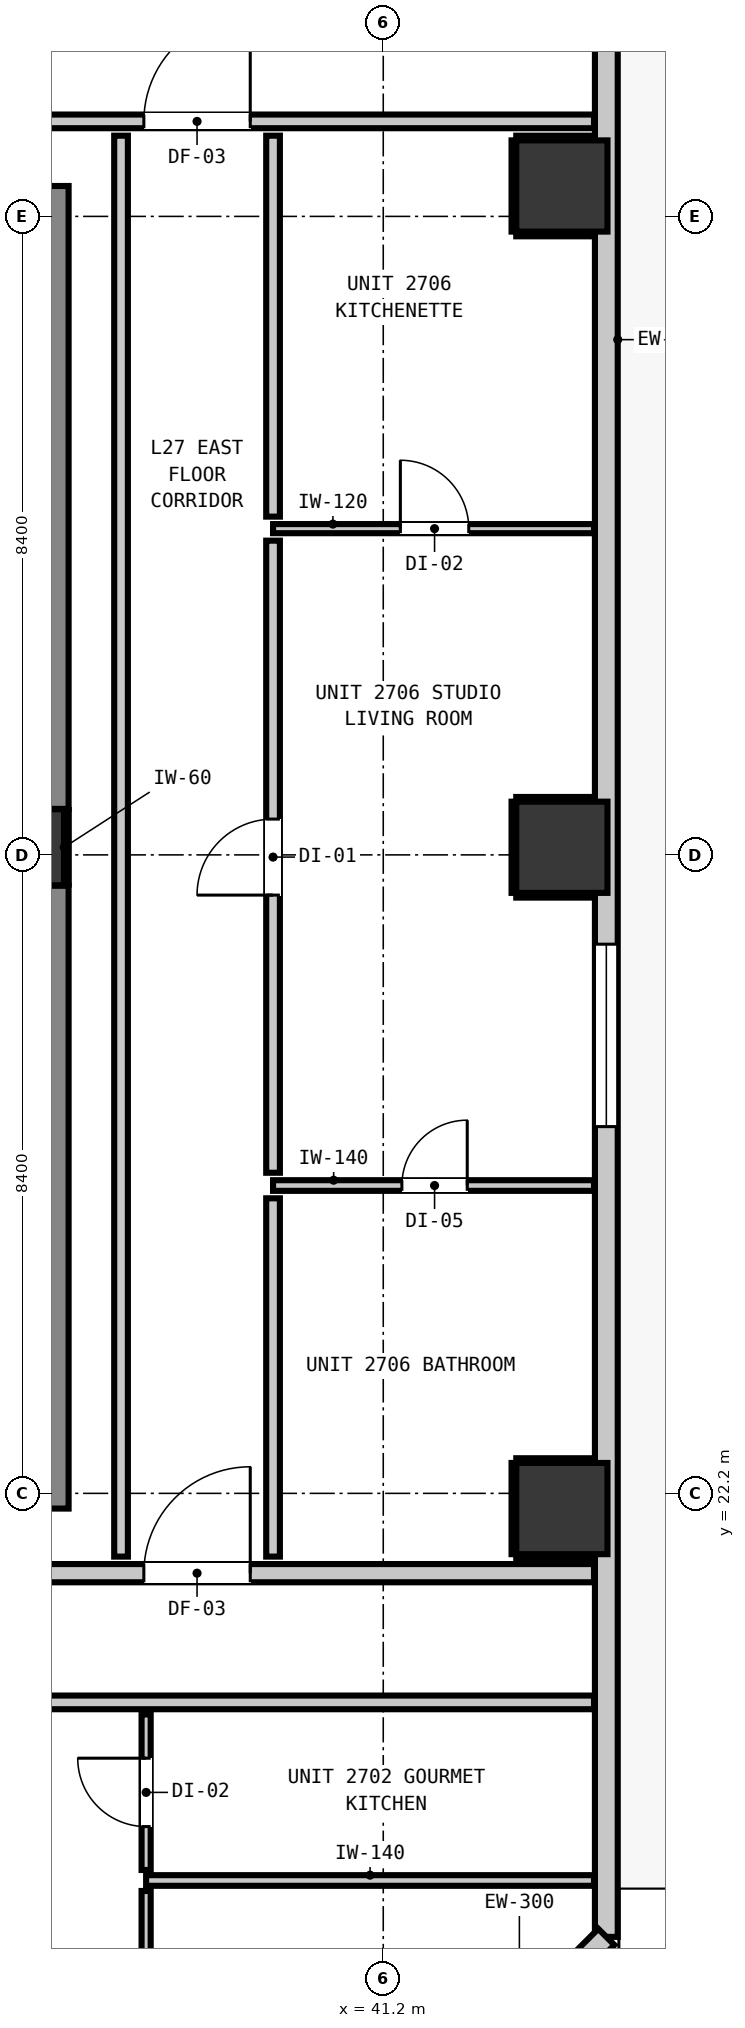
"""IFC4 building model, lengths in metres.
Left out: names, types, materials, properties, quantities, classifications, styles, units other than length and angle.
Written with IfcOpenShell. Run it as: python <this file> out.ifc"""

import sys

from ifc_helpers import new_model, si_unit, direction, frame, frame_2d, origin, origin_2d, place, context, subcontext, project, spatial, rectangle, extrude, element, fill, save


model = new_model("IFC4")
c1 = context("Model", 3, precision=1e-05, world=origin(), true_north=direction((0.0, 1.0)))
c2 = subcontext(c1, "Body", "Model", "MODEL_VIEW")
j1 = project(units=[si_unit("LENGTHUNIT", "METRE"), si_unit("PLANEANGLEUNIT", "RADIAN")], contexts=[c1])
p1 = place(None, origin())
s1 = spatial("IfcSite", under=j1, at=p1, CompositionType="ELEMENT")
p2 = place(p1, origin())
s2 = spatial("IfcBuilding", under=s1, at=p2, CompositionType="ELEMENT")
p3 = place(p2, frame((0.0, 0.0, 96.12)))
s3 = spatial("IfcBuildingStorey", under=s2, at=p3, CompositionType="ELEMENT", Elevation=96.12)
p4 = place(p3, frame((36.5, 30.7, 0.0), z_axis=(0.0, 0.0, 1.0), x_axis=(1.0, 0.0, 0.0)))
e1 = element("IfcColumn", 1, at=p4, inside=s3, PredefinedType="COLUMN", context=c2, shape_type="SweptSolid", body=[
    extrude(rectangle(XDim=1.0, YDim=1.0, at=origin_2d()), origin(), (0.0, 0.0, 1.0), 3.32),
])
p5 = place(p3, frame((36.56, 22.0, 0.0), z_axis=(0.0, 0.0, 1.0), x_axis=(0.0, 1.0, 0.0)))
e2 = element("IfcWall", 2, at=p5, inside=s3, PredefinedType="SHEAR", context=c2, shape_type="SweptSolid", body=[
    extrude(rectangle(XDim=8.195, YDim=1.0, at=frame_2d((4.098, 0.0))), origin(), (0.0, 0.0, 1.0), 3.32),
])
p6 = place(p3, frame((36.56, 31.205, 0.0), z_axis=(0.0, 0.0, 1.0), x_axis=(0.0, 1.0, 0.0)))
e3 = element("IfcWall", 3, at=p6, inside=s3, PredefinedType="SHEAR", context=c2, shape_type="SweptSolid", body=[
    extrude(rectangle(XDim=8.195, YDim=1.0, at=frame_2d((4.097, 0.0))), origin(), (0.0, 0.0, 1.0), 3.32),
])
for number, where, z_axis, x_axis in (
    (4, (43.55, 22.0, 0.0), (0.0, 0.0, 1.0), (1.0, 0.0, 0.0)),
    (5, (43.55, 30.7, 0.0), (0.0, 0.0, 1.0), (1.0, 0.0, 0.0)),
    (6, (43.55, 39.4, 0.0), (0.0, 0.0, 1.0), (1.0, 0.0, 0.0)),
):
    element("IfcColumn", number, at=place(p3, frame(where, z_axis=z_axis, x_axis=x_axis)), inside=s3, PredefinedType="COLUMN", context=c2, shape_type="SweptSolid", body=[
        extrude(rectangle(XDim=1.2, YDim=1.2, at=origin_2d()), origin(), (0.0, 0.0, 1.0), 3.32),
    ])
p7 = place(p3, frame((44.135, 51.035, 0.0), z_axis=(0.0, 0.0, 1.0), x_axis=(0.0, -1.0, 0.0)))
e7 = element("IfcWall", 7, at=p7, inside=s3, PredefinedType="STANDARD", context=c2, shape_type="SweptSolid", body=[
    extrude(rectangle(XDim=34.67, YDim=0.3, at=frame_2d((17.335, 0.0))), origin(), (0.0, 0.0, 1.0), 3.06),
])
p8 = place(p7, frame((0.901, 0.0, 0.0)))
e8 = element("IfcOpeningElement", 8, at=p8, cuts=e7, PredefinedType="OPENING", context=c2, shape_type="SweptSolid", body=[
    extrude(rectangle(XDim=1.0, YDim=2.15, at=frame_2d((0.5, 1.075))), frame((0.0, 0.16, 0.0), z_axis=(0.0, -1.0, 0.0), x_axis=(1.0, 0.0, 0.0)), (0.0, 0.0, 1.0), 0.32),
])
p9 = place(p7, frame((3.303, 0.0, 0.85)))
e9 = element("IfcOpeningElement", 9, at=p9, cuts=e7, PredefinedType="OPENING", context=c2, shape_type="SweptSolid", body=[
    extrude(rectangle(XDim=2.4, YDim=1.95, at=frame_2d((1.2, 0.975))), frame((0.0, 0.16, 0.0), z_axis=(0.0, -1.0, 0.0), x_axis=(1.0, 0.0, 0.0)), (0.0, 0.0, 1.0), 0.32),
])
p10 = place(p7, frame((21.61, 0.0, 0.85)))
e10 = element("IfcOpeningElement", 10, at=p10, cuts=e7, PredefinedType="OPENING", context=c2, shape_type="SweptSolid", body=[
    extrude(rectangle(XDim=2.4, YDim=1.95, at=frame_2d((1.2, 0.975))), frame((0.0, 0.16, 0.0), z_axis=(0.0, -1.0, 0.0), x_axis=(1.0, 0.0, 0.0)), (0.0, 0.0, 1.0), 0.32),
])
p11 = place(p3, frame((44.135, 16.365, 0.0), z_axis=(0.0, 0.0, 1.0), x_axis=(-0.707106781187, -0.707106781187, 0.0)))
e11 = element("IfcWall", 11, at=p11, inside=s3, PredefinedType="STANDARD", context=c2, shape_type="SweptSolid", body=[
    extrude(rectangle(XDim=3.536, YDim=0.3, at=frame_2d((1.768, 0.0))), origin(), (0.0, 0.0, 1.0), 3.06),
])
p12 = place(p3, frame((12.993, 21.15, 0.0), z_axis=(0.0, 0.0, 1.0), x_axis=(1.0, 0.0, 0.0)))
e12 = element("IfcWall", 12, at=p12, inside=s3, PredefinedType="PARTITIONING", context=c2, shape_type="SweptSolid", body=[
    extrude(rectangle(XDim=30.98, YDim=0.24, at=frame_2d((15.49, 0.0))), origin(), (0.0, 0.0, 1.0), 3.06),
])
p13 = place(p12, frame((5.217, 0.0, 0.0)))
e13 = element("IfcOpeningElement", 13, at=p13, cuts=e12, PredefinedType="OPENING", context=c2, shape_type="SweptSolid", body=[
    extrude(rectangle(XDim=1.1, YDim=2.15, at=frame_2d((0.55, 1.075))), frame((0.0, 0.13, 0.0), z_axis=(0.0, -1.0, 0.0), x_axis=(1.0, 0.0, 0.0)), (0.0, 0.0, 1.0), 0.26),
])
p14 = place(p12, frame((25.057, 0.0, 0.0)))
e14 = element("IfcOpeningElement", 14, at=p14, cuts=e12, PredefinedType="OPENING", context=c2, shape_type="SweptSolid", body=[
    extrude(rectangle(XDim=1.4, YDim=2.15, at=frame_2d((0.7, 1.075))), frame((0.0, 0.13, 0.0), z_axis=(0.0, -1.0, 0.0), x_axis=(1.0, 0.0, 0.0)), (0.0, 0.0, 1.0), 0.26),
])
p15 = place(p3, frame((12.993, 19.45, 0.0), z_axis=(0.0, 0.0, 1.0), x_axis=(1.0, 0.0, 0.0)))
e15 = element("IfcWall", 15, at=p15, inside=s3, PredefinedType="PARTITIONING", context=c2, shape_type="SweptSolid", body=[
    extrude(rectangle(XDim=30.98, YDim=0.18, at=frame_2d((15.49, 0.0))), origin(), (0.0, 0.0, 1.0), 3.06),
])
p16 = place(p15, frame((20.937, 0.0, 0.0)))
e16 = element("IfcOpeningElement", 16, at=p16, cuts=e15, PredefinedType="OPENING", context=c2, shape_type="SweptSolid", body=[
    extrude(rectangle(XDim=1.0, YDim=2.15, at=frame_2d((0.5, 1.075))), frame((0.0, 0.1, 0.0), z_axis=(0.0, -1.0, 0.0), x_axis=(1.0, 0.0, 0.0)), (0.0, 0.0, 1.0), 0.2),
])
p17 = place(p3, frame((1.827, 40.25, 0.0), z_axis=(0.0, 0.0, 1.0), x_axis=(1.0, 0.0, 0.0)))
e17 = element("IfcWall", 17, at=p17, inside=s3, PredefinedType="PARTITIONING", context=c2, shape_type="SweptSolid", body=[
    extrude(rectangle(XDim=42.146, YDim=0.18, at=frame_2d((21.073, 0.0))), origin(), (0.0, 0.0, 1.0), 3.06),
])
p18 = place(p17, frame((15.608, 0.0, 0.0)))
e18 = element("IfcOpeningElement", 18, at=p18, cuts=e17, PredefinedType="OPENING", context=c2, shape_type="SweptSolid", body=[
    extrude(rectangle(XDim=1.4, YDim=2.15, at=frame_2d((0.7, 1.075))), frame((0.0, 0.1, 0.0), z_axis=(0.0, -1.0, 0.0), x_axis=(1.0, 0.0, 0.0)), (0.0, 0.0, 1.0), 0.2),
])
p19 = place(p17, frame((8.623, 0.0, 0.0)))
e19 = element("IfcOpeningElement", 19, at=p19, cuts=e17, PredefinedType="OPENING", context=c2, shape_type="SweptSolid", body=[
    extrude(rectangle(XDim=1.4, YDim=2.15, at=frame_2d((0.7, 1.075))), frame((0.0, 0.1, 0.0), z_axis=(0.0, -1.0, 0.0), x_axis=(1.0, 0.0, 0.0)), (0.0, 0.0, 1.0), 0.2),
])
p20 = place(p17, frame((36.223, 0.0, 0.0)))
e20 = element("IfcOpeningElement", 20, at=p20, cuts=e17, PredefinedType="OPENING", context=c2, shape_type="SweptSolid", body=[
    extrude(rectangle(XDim=1.4, YDim=2.15, at=frame_2d((0.7, 1.075))), frame((0.0, 0.1, 0.0), z_axis=(0.0, -1.0, 0.0), x_axis=(1.0, 0.0, 0.0)), (0.0, 0.0, 1.0), 0.2),
])
p21 = place(p3, frame((38.08, 17.107, 0.0), z_axis=(0.0, 0.0, 1.0), x_axis=(1.0, 0.0, 0.0)))
e21 = element("IfcWall", 21, at=p21, inside=s3, PredefinedType="PARTITIONING", context=c2, shape_type="SweptSolid", body=[
    extrude(rectangle(XDim=5.893, YDim=0.14, at=frame_2d((2.946, 0.0))), origin(), (0.0, 0.0, 1.0), 3.06),
])
p22 = place(p3, frame((39.75, 26.25, 0.0), z_axis=(0.0, 0.0, 1.0), x_axis=(1.0, 0.0, 0.0)))
e22 = element("IfcWall", 22, at=p22, inside=s3, PredefinedType="PARTITIONING", context=c2, shape_type="SweptSolid", body=[
    extrude(rectangle(XDim=4.223, YDim=0.14, at=frame_2d((2.111, 0.0))), origin(), (0.0, 0.0, 1.0), 3.06),
])
p23 = place(p22, frame((1.695, 0.0, 0.0)))
e23 = element("IfcOpeningElement", 23, at=p23, cuts=e22, PredefinedType="OPENING", context=c2, shape_type="SweptSolid", body=[
    extrude(rectangle(XDim=0.86, YDim=2.02, at=frame_2d((0.43, 1.01))), frame((0.0, 0.08, 0.0), z_axis=(0.0, -1.0, 0.0), x_axis=(1.0, 0.0, 0.0)), (0.0, 0.0, 1.0), 0.16),
])
p24 = place(p3, frame((39.75, 34.892, 0.0), z_axis=(0.0, 0.0, 1.0), x_axis=(1.0, 0.0, 0.0)))
e24 = element("IfcWall", 24, at=p24, inside=s3, PredefinedType="PARTITIONING", context=c2, shape_type="SweptSolid", body=[
    extrude(rectangle(XDim=4.223, YDim=0.12, at=frame_2d((2.111, 0.0))), origin(), (0.0, 0.0, 1.0), 3.06),
])
p25 = place(p24, frame((1.675, 0.0, 0.0)))
e25 = element("IfcOpeningElement", 25, at=p25, cuts=e24, PredefinedType="OPENING", context=c2, shape_type="SweptSolid", body=[
    extrude(rectangle(XDim=0.9, YDim=2.1, at=frame_2d((0.45, 1.05))), frame((0.0, 0.07, 0.0), z_axis=(0.0, -1.0, 0.0), x_axis=(1.0, 0.0, 0.0)), (0.0, 0.0, 1.0), 0.14),
])
p26 = place(p3, frame((37.75, 21.368, 0.0), z_axis=(0.0, 0.0, 1.0), x_axis=(0.0, 1.0, 0.0)))
e26 = element("IfcWall", 26, at=p26, inside=s3, PredefinedType="PARTITIONING", context=c2, shape_type="SweptSolid", body=[
    extrude(rectangle(XDim=18.694, YDim=0.18, at=frame_2d((9.347, 0.0))), origin(), (0.0, 0.0, 1.0), 3.06),
])
p27 = place(p3, frame((39.75, 21.368, 0.0), z_axis=(0.0, 0.0, 1.0), x_axis=(0.0, 1.0, 0.0)))
e27 = element("IfcWall", 27, at=p27, inside=s3, PredefinedType="PARTITIONING", context=c2, shape_type="SweptSolid", body=[
    extrude(rectangle(XDim=4.714, YDim=0.18, at=frame_2d((2.357, 0.0))), origin(), (0.0, 0.0, 1.0), 3.06),
])
p28 = place(p3, frame((39.75, 26.418, 0.0), z_axis=(0.0, 0.0, 1.0), x_axis=(0.0, 1.0, 0.0)))
e28 = element("IfcWall", 28, at=p28, inside=s3, PredefinedType="PARTITIONING", context=c2, shape_type="SweptSolid", body=[
    extrude(rectangle(XDim=8.316, YDim=0.18, at=frame_2d((4.158, 0.0))), origin(), (0.0, 0.0, 1.0), 3.06),
])
p29 = place(p28, frame((3.653, 0.0, 0.0)))
e29 = element("IfcOpeningElement", 29, at=p29, cuts=e28, PredefinedType="OPENING", context=c2, shape_type="SweptSolid", body=[
    extrude(rectangle(XDim=1.0, YDim=2.15, at=frame_2d((0.5, 1.075))), frame((0.0, 0.1, 0.0), z_axis=(0.0, -1.0, 0.0), x_axis=(1.0, 0.0, 0.0)), (0.0, 0.0, 1.0), 0.2),
])
p30 = place(p3, frame((39.75, 35.05, 0.0), z_axis=(0.0, 0.0, 1.0), x_axis=(0.0, 1.0, 0.0)))
e30 = element("IfcWall", 30, at=p30, inside=s3, PredefinedType="PARTITIONING", context=c2, shape_type="SweptSolid", body=[
    extrude(rectangle(XDim=5.012, YDim=0.18, at=frame_2d((2.506, 0.0))), origin(), (0.0, 0.0, 1.0), 3.06),
])
p31 = place(p3, frame((38.08, 14.027, 0.0), z_axis=(0.0, 0.0, 1.0), x_axis=(0.0, 1.0, 0.0)))
e31 = element("IfcWall", 31, at=p31, inside=s3, PredefinedType="PARTITIONING", context=c2, shape_type="SweptSolid", body=[
    extrude(rectangle(XDim=2.942, YDim=0.12, at=frame_2d((1.471, 0.0))), origin(), (0.0, 0.0, 1.0), 3.06),
])
p32 = place(p31, frame((1.249, 0.0, 0.0)))
e32 = element("IfcOpeningElement", 32, at=p32, cuts=e31, PredefinedType="OPENING", context=c2, shape_type="SweptSolid", body=[
    extrude(rectangle(XDim=0.9, YDim=2.1, at=frame_2d((0.45, 1.05))), frame((0.0, 0.07, 0.0), z_axis=(0.0, -1.0, 0.0), x_axis=(1.0, 0.0, 0.0)), (0.0, 0.0, 1.0), 0.14),
])
p33 = place(p3, frame((38.08, 17.245, 0.0), z_axis=(0.0, 0.0, 1.0), x_axis=(0.0, 1.0, 0.0)))
e33 = element("IfcWall", 33, at=p33, inside=s3, PredefinedType="PARTITIONING", context=c2, shape_type="SweptSolid", body=[
    extrude(rectangle(XDim=2.047, YDim=0.12, at=frame_2d((1.023, 0.0))), origin(), (0.0, 0.0, 1.0), 3.06),
])
p34 = place(p33, frame((0.571, 0.0, 0.0)))
e34 = element("IfcOpeningElement", 34, at=p34, cuts=e33, PredefinedType="OPENING", context=c2, shape_type="SweptSolid", body=[
    extrude(rectangle(XDim=0.9, YDim=2.1, at=frame_2d((0.45, 1.05))), frame((0.0, 0.07, 0.0), z_axis=(0.0, -1.0, 0.0), x_axis=(1.0, 0.0, 0.0)), (0.0, 0.0, 1.0), 0.14),
])
p35 = place(p3, frame((37.032, 30.21, 0.0), z_axis=(0.0, 0.0, 1.0), x_axis=(0.0, 1.0, 0.0)))
e35 = element("IfcWall", 35, at=p35, inside=s3, PredefinedType="PARTITIONING", context=c2, shape_type="SweptSolid", body=[
    extrude(rectangle(XDim=0.98, YDim=0.06, at=frame_2d((0.49, 0.0))), origin(), (0.0, 0.0, 1.0), 1.45),
])
for number, where, z_axis, x_axis in (
    (36, (42.95, 21.368, 0.0), (0.0, 0.0, 1.0), (1.0, 0.0, 0.0)),
    (37, (42.95, 22.632, 0.0), (0.0, 0.0, 1.0), (1.0, 0.0, 0.0)),
):
    element("IfcWall", number, at=place(p3, frame(where, z_axis=z_axis, x_axis=x_axis)), inside=s3, PredefinedType="PARTITIONING", context=c2, shape_type="SweptSolid", body=[
        extrude(rectangle(XDim=1.02, YDim=0.06, at=frame_2d((0.51, 0.0))), origin(), (0.0, 0.0, 1.0), 1.45),
    ])
p36 = place(p3, frame((42.918, 21.4, 0.0), z_axis=(0.0, 0.0, 1.0), x_axis=(0.0, 1.0, 0.0)))
e38 = element("IfcWall", 38, at=p36, inside=s3, PredefinedType="PARTITIONING", context=c2, shape_type="SweptSolid", body=[
    extrude(rectangle(XDim=1.2, YDim=0.06, at=frame_2d((0.6, 0.0))), origin(), (0.0, 0.0, 1.0), 1.45),
])
for number, where, z_axis, x_axis in (
    (39, (42.95, 30.068, 0.0), (0.0, 0.0, 1.0), (1.0, 0.0, 0.0)),
    (40, (42.95, 31.332, 0.0), (0.0, 0.0, 1.0), (1.0, 0.0, 0.0)),
):
    element("IfcWall", number, at=place(p3, frame(where, z_axis=z_axis, x_axis=x_axis)), inside=s3, PredefinedType="PARTITIONING", context=c2, shape_type="SweptSolid", body=[
        extrude(rectangle(XDim=1.02, YDim=0.06, at=frame_2d((0.51, 0.0))), origin(), (0.0, 0.0, 1.0), 1.45),
    ])
p37 = place(p3, frame((42.918, 30.1, 0.0), z_axis=(0.0, 0.0, 1.0), x_axis=(0.0, 1.0, 0.0)))
e41 = element("IfcWall", 41, at=p37, inside=s3, PredefinedType="PARTITIONING", context=c2, shape_type="SweptSolid", body=[
    extrude(rectangle(XDim=1.2, YDim=0.06, at=frame_2d((0.6, 0.0))), origin(), (0.0, 0.0, 1.0), 1.45),
])
for number, where, z_axis, x_axis in (
    (42, (42.95, 38.768, 0.0), (0.0, 0.0, 1.0), (1.0, 0.0, 0.0)),
    (43, (42.95, 40.032, 0.0), (0.0, 0.0, 1.0), (1.0, 0.0, 0.0)),
):
    element("IfcWall", number, at=place(p3, frame(where, z_axis=z_axis, x_axis=x_axis)), inside=s3, PredefinedType="PARTITIONING", context=c2, shape_type="SweptSolid", body=[
        extrude(rectangle(XDim=1.02, YDim=0.06, at=frame_2d((0.51, 0.0))), origin(), (0.0, 0.0, 1.0), 1.45),
    ])
p38 = place(p3, frame((42.918, 38.8, 0.0), z_axis=(0.0, 0.0, 1.0), x_axis=(0.0, 1.0, 0.0)))
e44 = element("IfcWall", 44, at=p38, inside=s3, PredefinedType="PARTITIONING", context=c2, shape_type="SweptSolid", body=[
    extrude(rectangle(XDim=1.2, YDim=0.06, at=frame_2d((0.6, 0.0))), origin(), (0.0, 0.0, 1.0), 1.45),
])
p39 = place(p10, origin())
e45 = element("IfcWindow", 45, at=p39, inside=s3, PartitioningType="SINGLE_PANEL", PredefinedType="WINDOW", context=c2, shape_type="SweptSolid", body=[
    extrude(rectangle(XDim=2.4, YDim=1.95, at=frame_2d((1.2, 0.975))), frame((0.0, 0.03, 0.0), z_axis=(0.0, -1.0, 0.0), x_axis=(1.0, 0.0, 0.0)), (0.0, 0.0, 1.0), 0.06),
])
fill(e10, e45)
p40 = place(p14, origin())
e46 = element("IfcDoor", 46, at=p40, inside=s3, OperationType="SINGLE_SWING_RIGHT", PredefinedType="DOOR", context=c2, shape_type="SweptSolid", body=[
    extrude(rectangle(XDim=1.4, YDim=2.15, at=frame_2d((0.7, 1.075))), frame((0.0, 0.025, 0.0), z_axis=(0.0, -1.0, 0.0), x_axis=(1.0, 0.0, 0.0)), (0.0, 0.0, 1.0), 0.05),
])
fill(e14, e46)
p41 = place(p20, origin())
e47 = element("IfcDoor", 47, at=p41, inside=s3, OperationType="SINGLE_SWING_RIGHT", PredefinedType="DOOR", context=c2, shape_type="SweptSolid", body=[
    extrude(rectangle(XDim=1.4, YDim=2.15, at=frame_2d((0.7, 1.075))), frame((0.0, 0.025, 0.0), z_axis=(0.0, -1.0, 0.0), x_axis=(1.0, 0.0, 0.0)), (0.0, 0.0, 1.0), 0.05),
])
fill(e20, e47)
p42 = place(p34, origin())
e48 = element("IfcDoor", 48, at=p42, inside=s3, OperationType="SINGLE_SWING_RIGHT", PredefinedType="DOOR", context=c2, shape_type="SweptSolid", body=[
    extrude(rectangle(XDim=0.9, YDim=2.1, at=frame_2d((0.45, 1.05))), frame((0.0, 0.025, 0.0), z_axis=(0.0, -1.0, 0.0), x_axis=(1.0, 0.0, 0.0)), (0.0, 0.0, 1.0), 0.05),
])
fill(e34, e48)
p43 = place(p29, origin())
e49 = element("IfcDoor", 49, at=p43, inside=s3, OperationType="SINGLE_SWING_LEFT", PredefinedType="DOOR", context=c2, shape_type="SweptSolid", body=[
    extrude(rectangle(XDim=1.0, YDim=2.15, at=frame_2d((0.5, 1.075))), frame((0.0, 0.025, 0.0), z_axis=(0.0, -1.0, 0.0), x_axis=(1.0, 0.0, 0.0)), (0.0, 0.0, 1.0), 0.05),
])
fill(e29, e49)
p44 = place(p23, origin())
e50 = element("IfcDoor", 50, at=p44, inside=s3, OperationType="SINGLE_SWING_RIGHT", PredefinedType="DOOR", context=c2, shape_type="SweptSolid", body=[
    extrude(rectangle(XDim=0.86, YDim=2.02, at=frame_2d((0.43, 1.01))), frame((0.0, 0.025, 0.0), z_axis=(0.0, -1.0, 0.0), x_axis=(1.0, 0.0, 0.0)), (0.0, 0.0, 1.0), 0.05),
])
fill(e23, e50)
p45 = place(p25, origin())
e51 = element("IfcDoor", 51, at=p45, inside=s3, OperationType="SINGLE_SWING_LEFT", PredefinedType="DOOR", context=c2, shape_type="SweptSolid", body=[
    extrude(rectangle(XDim=0.9, YDim=2.1, at=frame_2d((0.45, 1.05))), frame((0.0, 0.025, 0.0), z_axis=(0.0, -1.0, 0.0), x_axis=(1.0, 0.0, 0.0)), (0.0, 0.0, 1.0), 0.05),
])
fill(e25, e51)
save(model, sys.argv[1])
